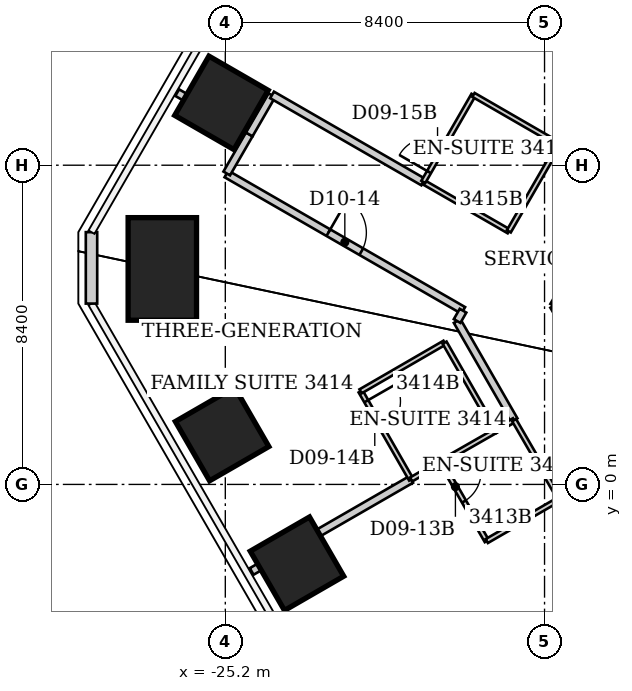
"""IFC4 building model, lengths in metres.
Left out: names, types, materials, properties, quantities, classifications, styles, units other than length and angle.
Written with IfcOpenShell. Run it as: python <this file> out.ifc"""

import sys

from ifc_helpers import new_model, si_unit, direction, frame, frame_2d, origin, origin_2d, place, context, subcontext, project, spatial, rectangle, extrude, element, fill, save


model = new_model("IFC4")
c1 = context("Model", 3, precision=1e-05, world=origin(), true_north=direction((0.0, 1.0)))
c2 = subcontext(c1, "Body", "Model", "MODEL_VIEW")
j1 = project(units=[si_unit("LENGTHUNIT", "METRE"), si_unit("PLANEANGLEUNIT", "RADIAN")], contexts=[c1])
p1 = place(None, origin())
s1 = spatial("IfcSite", under=j1, at=p1, CompositionType="ELEMENT")
p2 = place(p1, origin())
s2 = spatial("IfcBuilding", under=s1, at=p2, CompositionType="ELEMENT")
p3 = place(p2, frame((0.0, 0.0, 138.6)))
s3 = spatial("IfcBuildingStorey", under=s2, at=p3, CompositionType="ELEMENT", Elevation=138.6)
for number, where, z_axis, x_axis in (
    (1, (-23.314, -2.087, 0.0), (0.0, 0.0, 1.0), (-0.866, -0.5, 0.0)),
    (2, (-25.284, 1.325, 0.0), (0.0, 0.0, 1.0), (-0.866, -0.5, 0.0)),
):
    element("IfcColumn", number, at=place(p3, frame(where, z_axis=z_axis, x_axis=x_axis)), inside=s3, PredefinedType="COLUMN", context=c2, shape_type="SweptSolid", body=[
        extrude(rectangle(XDim=1.8, YDim=1.8, at=origin_2d()), origin(), (0.0, 0.0, 1.0), 3.8),
    ])
p4 = place(p3, frame((-26.857, 5.67, 0.0), z_axis=(0.0, 0.0, 1.0), x_axis=(-1.0, 0.0, 0.0)))
e3 = element("IfcColumn", 3, at=p4, inside=s3, PredefinedType="COLUMN", context=c2, shape_type="SweptSolid", body=[
    extrude(rectangle(XDim=1.8, YDim=2.7, at=origin_2d()), origin(), (0.0, 0.0, 1.0), 3.8),
])
p5 = place(p3, frame((-25.302, 10.041, 0.0), z_axis=(0.0, 0.0, 1.0), x_axis=(-0.866025403784, 0.5, 0.0)))
e4 = element("IfcColumn", 4, at=p5, inside=s3, PredefinedType="COLUMN", context=c2, shape_type="SweptSolid", body=[
    extrude(rectangle(XDim=1.8, YDim=1.8, at=origin_2d()), origin(), (0.0, 0.0, 1.0), 3.8),
])
p6 = place(p3, frame((-28.721, 4.759, 0.0), z_axis=(0.0, 0.0, 1.0), x_axis=(0.0, 1.0, 0.0)))
e5 = element("IfcWall", 5, at=p6, inside=s3, PredefinedType="SOLIDWALL", context=c2, shape_type="SweptSolid", body=[
    extrude(rectangle(XDim=1.88, YDim=0.3, at=frame_2d((0.94, 0.0))), origin(), (0.0, 0.0, 1.0), 3.64),
])
p7 = place(p3, frame((-26.466, 10.31, 0.0), z_axis=(0.0, 0.0, 1.0), x_axis=(0.865037029405, -0.501708020425, 0.0)))
e6 = element("IfcWall", 6, at=p7, inside=s3, PredefinedType="PARTITIONING", context=c2, shape_type="SweptSolid", body=[
    extrude(rectangle(XDim=2.177, YDim=0.2, at=frame_2d((1.089, 0.0))), origin(), (0.0, 0.0, 1.0), 3.64),
])
p8 = place(p3, frame((-25.17, 8.17, 0.0), z_axis=(0.0, 0.0, 1.0), x_axis=(0.866448885678, -0.499265789443, 0.0)))
e7 = element("IfcWall", 7, at=p8, inside=s3, PredefinedType="PARTITIONING", context=c2, shape_type="SweptSolid", body=[
    extrude(rectangle(XDim=7.19, YDim=0.2, at=frame_2d((3.595, 0.0))), origin(), (0.0, 0.0, 1.0), 3.64),
])
p9 = place(p8, frame((3.095, 0.0, 0.0)))
e8 = element("IfcOpeningElement", 8, at=p9, cuts=e7, PredefinedType="OPENING", context=c2, shape_type="SweptSolid", body=[
    extrude(rectangle(XDim=1.0, YDim=2.13, at=frame_2d((0.5, 1.065))), frame((0.0, 0.1, 0.0), z_axis=(0.0, -1.0, 0.0), x_axis=(1.0, 0.0, 0.0)), (0.0, 0.0, 1.0), 0.2),
])
p10 = place(p3, frame((-25.163, 8.183, 0.0), z_axis=(0.0, 0.0, 1.0), x_axis=(0.499793761865, 0.866144442689, 0.0)))
e9 = element("IfcWall", 9, at=p10, inside=s3, PredefinedType="PARTITIONING", context=c2, shape_type="SweptSolid", body=[
    extrude(rectangle(XDim=1.186, YDim=0.2, at=frame_2d((0.593, 0.0))), origin(), (0.0, 0.0, 1.0), 3.64),
])
p11 = place(p3, frame((-24.57, 9.21, 0.0), z_axis=(0.0, 0.0, 1.0), x_axis=(0.499734288277, 0.866178758179, 0.0)))
e10 = element("IfcWall", 10, at=p11, inside=s3, PredefinedType="PARTITIONING", context=c2, shape_type="SweptSolid", body=[
    extrude(rectangle(XDim=1.191, YDim=0.2, at=frame_2d((0.595, 0.0))), origin(), (0.0, 0.0, 1.0), 3.64),
])
p12 = place(p3, frame((-24.506, -2.29, 0.0), z_axis=(0.0, 0.0, 1.0), x_axis=(0.86626361228, 0.499587183622, 0.0)))
e11 = element("IfcWall", 11, at=p12, inside=s3, PredefinedType="PARTITIONING", context=c2, shape_type="SweptSolid", body=[
    extrude(rectangle(XDim=4.844, YDim=0.2, at=frame_2d((2.422, 0.0))), origin(), (0.0, 0.0, 1.0), 3.64),
])
p13 = place(p3, frame((-23.97, 10.25, 0.0), z_axis=(0.0, 0.0, 1.0), x_axis=(0.86645101645, -0.499262091585, 0.0)))
e12 = element("IfcWall", 12, at=p13, inside=s3, PredefinedType="PARTITIONING", context=c2, shape_type="SweptSolid", body=[
    extrude(rectangle(XDim=4.592, YDim=0.2, at=frame_2d((2.296, 0.0))), origin(), (0.0, 0.0, 1.0), 3.64),
])
p14 = place(p3, frame((-21.64, 2.45, 0.0), z_axis=(0.0, 0.0, 1.0), x_axis=(0.497288831399, -0.867585049529, 0.0)))
e13 = element("IfcWall", 13, at=p14, inside=s3, PredefinedType="PARTITIONING", context=c2, shape_type="SweptSolid", body=[
    extrude(rectangle(XDim=2.674, YDim=0.12, at=frame_2d((1.337, 0.0))), origin(), (0.0, 0.0, 1.0), 3.64),
])
p15 = place(p14, frame((0.3, 0.0, 0.0)))
e14 = element("IfcOpeningElement", 14, at=p15, cuts=e13, PredefinedType="OPENING", context=c2, shape_type="SweptSolid", body=[
    extrude(rectangle(XDim=0.9, YDim=2.03, at=frame_2d((0.45, 1.015))), frame((0.0, 0.06, 0.0), z_axis=(0.0, -1.0, 0.0), x_axis=(1.0, 0.0, 0.0)), (0.0, 0.0, 1.0), 0.12),
])
p16 = place(p3, frame((-20.31, 0.13, 0.0), z_axis=(0.0, 0.0, 1.0), x_axis=(0.864088651014, 0.503339649926, 0.0)))
e15 = element("IfcWall", 15, at=p16, inside=s3, PredefinedType="PARTITIONING", context=c2, shape_type="SweptSolid", body=[
    extrude(rectangle(XDim=0.914, YDim=0.12, at=frame_2d((0.457, 0.0))), origin(), (0.0, 0.0, 1.0), 3.64),
])
p17 = place(p3, frame((-19.991, 7.958, 0.0), z_axis=(0.0, 0.0, 1.0), x_axis=(0.866404475641, -0.499342852747, 0.0)))
e16 = element("IfcWall", 16, at=p17, inside=s3, PredefinedType="PARTITIONING", context=c2, shape_type="SweptSolid", body=[
    extrude(rectangle(XDim=2.599, YDim=0.12, at=frame_2d((1.299, 0.0))), origin(), (0.0, 0.0, 1.0), 3.64),
])
p18 = place(p3, frame((-19.52, 0.59, 0.0), z_axis=(0.0, 0.0, 1.0), x_axis=(0.499693115345, -0.866202511239, 0.0)))
e17 = element("IfcWall", 17, at=p18, inside=s3, PredefinedType="PARTITIONING", context=c2, shape_type="SweptSolid", body=[
    extrude(rectangle(XDim=2.401, YDim=0.12, at=frame_2d((1.201, 0.0))), origin(), (0.0, 0.0, 1.0), 3.64),
])
p19 = place(p18, frame((0.3, 0.0, 0.0)))
e18 = element("IfcOpeningElement", 18, at=p19, cuts=e17, PredefinedType="OPENING", context=c2, shape_type="SweptSolid", body=[
    extrude(rectangle(XDim=0.9, YDim=2.03, at=frame_2d((0.45, 1.015))), frame((0.0, 0.06, 0.0), z_axis=(0.0, -1.0, 0.0), x_axis=(1.0, 0.0, 0.0)), (0.0, 0.0, 1.0), 0.12),
])
p20 = place(p3, frame((-19.52, 0.59, 0.0), z_axis=(0.0, 0.0, 1.0), x_axis=(0.868013991935, 0.496539736381, 0.0)))
e19 = element("IfcWall", 19, at=p20, inside=s3, PredefinedType="PARTITIONING", context=c2, shape_type="SweptSolid", body=[
    extrude(rectangle(XDim=1.64, YDim=0.12, at=frame_2d((0.82, 0.0))), origin(), (0.0, 0.0, 1.0), 3.64),
])
p21 = place(p3, frame((-19.43, 3.73, 0.0), z_axis=(0.0, 0.0, 1.0), x_axis=(-0.865328095335, -0.50120583339, 0.0)))
e20 = element("IfcWall", 20, at=p21, inside=s3, PredefinedType="PARTITIONING", context=c2, shape_type="SweptSolid", body=[
    extrude(rectangle(XDim=2.554, YDim=0.12, at=frame_2d((1.277, 0.0))), origin(), (0.0, 0.0, 1.0), 3.64),
])
p22 = place(p3, frame((-19.1, 4.3, 0.0), z_axis=(0.0, 0.0, 1.0), x_axis=(0.498268459914, -0.867022803538, 0.0)))
e21 = element("IfcWall", 21, at=p22, inside=s3, PredefinedType="PARTITIONING", context=c2, shape_type="SweptSolid", body=[
    extrude(rectangle(XDim=3.01, YDim=0.2, at=frame_2d((1.505, 0.0))), origin(), (0.0, 0.0, 1.0), 3.64),
])
p23 = place(p3, frame((-18.945, 4.571, 0.0), z_axis=(0.0, 0.0, 1.0), x_axis=(-0.496223092577, -0.868195048588, 0.0)))
e22 = element("IfcWall", 22, at=p23, inside=s3, PredefinedType="PARTITIONING", context=c2, shape_type="SweptSolid", body=[
    extrude(rectangle(XDim=0.312, YDim=0.2, at=frame_2d((0.156, 0.0))), origin(), (0.0, 0.0, 1.0), 3.64),
])
p24 = place(p3, frame((-18.67, 10.25, 0.0), z_axis=(0.0, 0.0, 1.0), x_axis=(-0.499407914056, -0.866366975004, 0.0)))
e23 = element("IfcWall", 23, at=p24, inside=s3, PredefinedType="PARTITIONING", context=c2, shape_type="SweptSolid", body=[
    extrude(rectangle(XDim=2.643, YDim=0.12, at=frame_2d((1.322, 0.0))), origin(), (0.0, 0.0, 1.0), 3.64),
])
p25 = place(p24, frame((1.443, 0.0, 0.0)))
e24 = element("IfcOpeningElement", 24, at=p25, cuts=e23, PredefinedType="OPENING", context=c2, shape_type="SweptSolid", body=[
    extrude(rectangle(XDim=0.9, YDim=2.03, at=frame_2d((0.45, 1.015))), frame((0.0, 0.06, 0.0), z_axis=(0.0, -1.0, 0.0), x_axis=(1.0, 0.0, 0.0)), (0.0, 0.0, 1.0), 0.12),
])
p26 = place(p3, frame((-18.32, -1.49, 0.0), z_axis=(0.0, 0.0, 1.0), x_axis=(0.865732595383, 0.500506816428, 0.0)))
e25 = element("IfcWall", 25, at=p26, inside=s3, PredefinedType="PARTITIONING", context=c2, shape_type="SweptSolid", body=[
    extrude(rectangle(XDim=2.218, YDim=0.12, at=frame_2d((1.109, 0.0))), origin(), (0.0, 0.0, 1.0), 3.023),
])
p27 = place(p3, frame((-18.1, 1.41, 0.0), z_axis=(0.0, 0.0, 1.0), x_axis=(-0.497288831399, 0.867585049529, 0.0)))
e26 = element("IfcWall", 26, at=p27, inside=s3, PredefinedType="PARTITIONING", context=c2, shape_type="SweptSolid", body=[
    extrude(rectangle(XDim=2.674, YDim=0.12, at=frame_2d((1.337, 0.0))), origin(), (0.0, 0.0, 1.0), 3.64),
])
p28 = place(p3, frame((-18.097, 1.404, 0.0), z_axis=(0.0, 0.0, 1.0), x_axis=(0.866823419736, 0.498615241441, 0.0)))
e27 = element("IfcWall", 27, at=p28, inside=s3, PredefinedType="PARTITIONING", context=c2, shape_type="SweptSolid", body=[
    extrude(rectangle(XDim=0.573, YDim=0.12, at=frame_2d((0.286, 0.0))), origin(), (0.0, 0.0, 1.0), 3.64),
])
p29 = place(p3, frame((-17.74, 6.66, 0.0), z_axis=(0.0, 0.0, 1.0), x_axis=(0.500519174073, 0.865725450929, 0.0)))
e28 = element("IfcWall", 28, at=p29, inside=s3, PredefinedType="PARTITIONING", context=c2, shape_type="SweptSolid", body=[
    extrude(rectangle(XDim=2.643, YDim=0.12, at=frame_2d((1.322, 0.0))), origin(), (0.0, 0.0, 1.0), 3.64),
])
p30 = place(p3, frame((-17.6, 1.69, 0.0), z_axis=(0.0, 0.0, 1.0), x_axis=(0.501623408317, -0.865086097581, 0.0)))
e29 = element("IfcWall", 29, at=p30, inside=s3, PredefinedType="PARTITIONING", context=c2, shape_type="SweptSolid", body=[
    extrude(rectangle(XDim=2.393, YDim=0.12, at=frame_2d((1.196, 0.0))), origin(), (0.0, 0.0, 1.0), 3.64),
])
p31 = place(p3, frame((-16.56, 4.7, 0.0), z_axis=(0.0, 0.0, 1.0), x_axis=(0.4998524389, 0.866110581465, 0.0)))
e30 = element("IfcWall", 30, at=p31, inside=s3, PredefinedType="PARTITIONING", context=c2, shape_type="SweptSolid", body=[
    extrude(rectangle(XDim=7.262, YDim=0.2, at=frame_2d((3.631, 0.0))), origin(), (0.0, 0.0, 1.0), 3.64),
])
p32 = place(p3, frame((-16.42, 8.95, 0.0), z_axis=(0.0, 0.0, 1.0), x_axis=(-0.865856933682, 0.500291685314, 0.0)))
e31 = element("IfcWall", 31, at=p32, inside=s3, PredefinedType="PARTITIONING", context=c2, shape_type="SweptSolid", body=[
    extrude(rectangle(XDim=2.599, YDim=0.12, at=frame_2d((1.299, 0.0))), origin(), (0.0, 0.0, 1.0), 3.64),
])
p33 = place(p3, frame((-11.99, -3.21, 0.0), z_axis=(0.0, 0.0, 1.0), x_axis=(-0.500269138002, 0.865869961116, 0.0)))
e32 = element("IfcWall", 32, at=p33, inside=s3, PredefinedType="PARTITIONING", context=c2, shape_type="SweptSolid", body=[
    extrude(rectangle(XDim=9.135, YDim=0.2, at=frame_2d((4.568, 0.0))), origin(), (0.0, 0.0, 1.0), 3.64),
])
p34 = place(p33, frame((4.018, 0.0, 0.0)))
e33 = element("IfcOpeningElement", 33, at=p34, cuts=e32, PredefinedType="OPENING", context=c2, shape_type="SweptSolid", body=[
    extrude(rectangle(XDim=1.1, YDim=2.2, at=frame_2d((0.55, 1.1))), frame((0.0, 0.1, 0.0), z_axis=(0.0, -1.0, 0.0), x_axis=(1.0, 0.0, 0.0)), (0.0, 0.0, 1.0), 0.2),
])
p35 = place(p19, origin())
e34 = element("IfcDoor", 34, at=p35, inside=s3, OperationType="SINGLE_SWING_LEFT", PredefinedType="DOOR", context=c2, shape_type="SweptSolid", body=[
    extrude(rectangle(XDim=0.9, YDim=2.03, at=frame_2d((0.45, 1.015))), frame((0.0, 0.025, 0.0), z_axis=(0.0, -1.0, 0.0), x_axis=(1.0, 0.0, 0.0)), (0.0, 0.0, 1.0), 0.05),
])
fill(e18, e34)
p36 = place(p9, origin())
e35 = element("IfcDoor", 35, at=p36, inside=s3, OperationType="SINGLE_SWING_LEFT", PredefinedType="DOOR", context=c2, shape_type="SweptSolid", body=[
    extrude(rectangle(XDim=1.0, YDim=2.13, at=frame_2d((0.5, 1.065))), frame((0.0, 0.025, 0.0), z_axis=(0.0, -1.0, 0.0), x_axis=(1.0, 0.0, 0.0)), (0.0, 0.0, 1.0), 0.05),
])
fill(e8, e35)
p37 = place(p15, origin())
e36 = element("IfcDoor", 36, at=p37, inside=s3, OperationType="SINGLE_SWING_LEFT", PredefinedType="DOOR", context=c2, shape_type="SweptSolid", body=[
    extrude(rectangle(XDim=0.9, YDim=2.03, at=frame_2d((0.45, 1.015))), frame((0.0, 0.025, 0.0), z_axis=(0.0, -1.0, 0.0), x_axis=(1.0, 0.0, 0.0)), (0.0, 0.0, 1.0), 0.05),
])
fill(e14, e36)
p38 = place(p25, origin())
e37 = element("IfcDoor", 37, at=p38, inside=s3, OperationType="SINGLE_SWING_RIGHT", PredefinedType="DOOR", context=c2, shape_type="SweptSolid", body=[
    extrude(rectangle(XDim=0.9, YDim=2.03, at=frame_2d((0.45, 1.015))), frame((0.0, 0.025, 0.0), z_axis=(0.0, -1.0, 0.0), x_axis=(1.0, 0.0, 0.0)), (0.0, 0.0, 1.0), 0.05),
])
fill(e24, e37)
save(model, sys.argv[1])
